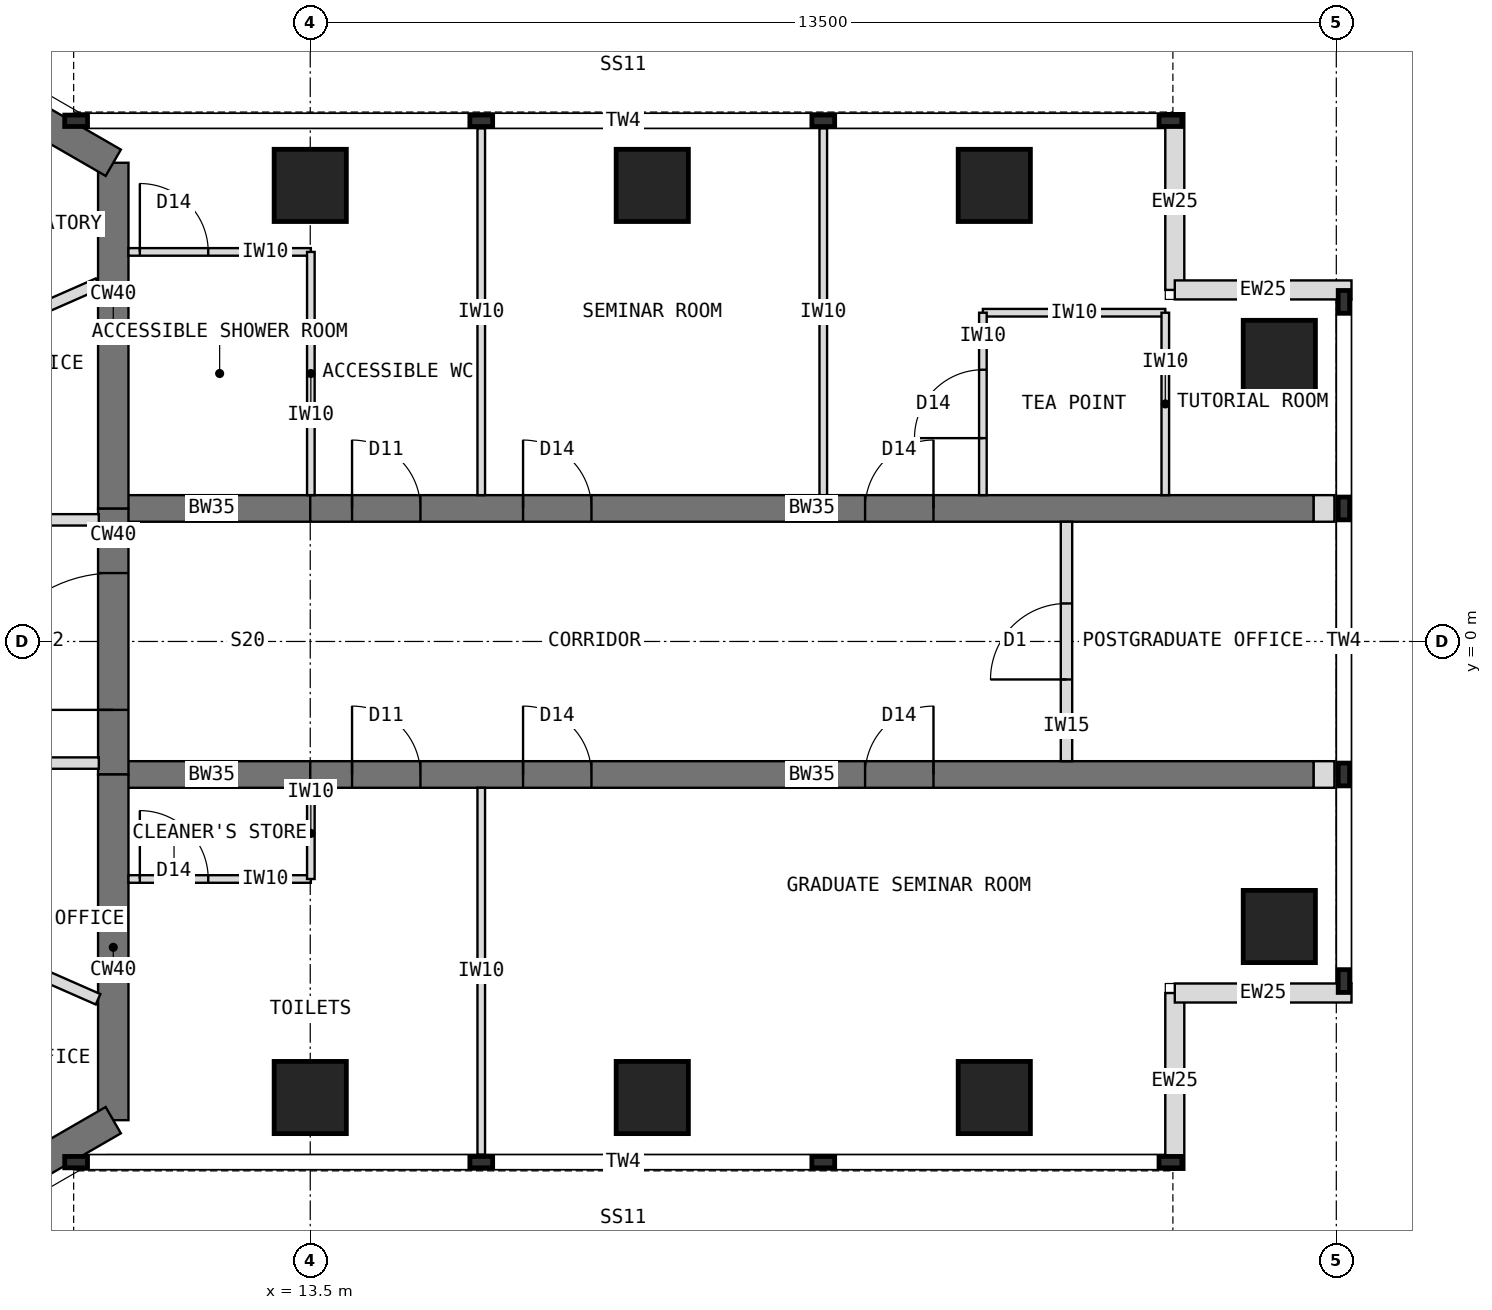
"""IFC4 building model, lengths in metres.
Left out: names, types, materials, properties, quantities, classifications, styles, units other than length and angle.
Written with IfcOpenShell. Run it as: python <this file> out.ifc"""

import sys

from ifc_helpers import new_model, si_unit, direction, frame, frame_2d, origin, origin_2d, place, context, subcontext, project, spatial, rectangle, extrude, element, fill, save


model = new_model("IFC4")
c1 = context("Model", 3, precision=1e-05, world=origin(), true_north=direction((0.0, 1.0)))
c2 = subcontext(c1, "Body", "Model", "MODEL_VIEW")
j1 = project(units=[si_unit("LENGTHUNIT", "METRE"), si_unit("PLANEANGLEUNIT", "RADIAN")], contexts=[c1])
p1 = place(None, origin())
s1 = spatial("IfcSite", under=j1, at=p1, CompositionType="ELEMENT")
p2 = place(p1, origin())
s2 = spatial("IfcBuilding", under=s1, at=p2, CompositionType="ELEMENT")
p3 = place(p2, frame((0.0, 0.0, 267.5)))
s3 = spatial("IfcBuildingStorey", under=s2, at=p3, CompositionType="ELEMENT", Elevation=267.5)
p4 = place(p3, frame((10.908, -6.298, 0.0), z_axis=(0.0, 0.0, 1.0), x_axis=(0.0, 1.0, 0.0)))
e1 = element("IfcWall", 1, at=p4, inside=s3, PredefinedType="SHEAR", context=c2, shape_type="SweptSolid", body=[
    extrude(rectangle(XDim=4.548, YDim=0.4, at=frame_2d((2.274, 0.0))), origin(), (0.0, 0.0, 1.0), 4.0),
])
p5 = place(p3, frame((10.908, -1.75, 0.0), z_axis=(0.0, 0.0, 1.0), x_axis=(0.0, 1.0, 0.0)))
e2 = element("IfcWall", 2, at=p5, inside=s3, PredefinedType="SHEAR", context=c2, shape_type="SweptSolid", body=[
    extrude(rectangle(XDim=3.5, YDim=0.4, at=frame_2d((1.75, 0.0))), origin(), (0.0, 0.0, 1.0), 4.0),
])
p6 = place(p5, frame((0.85, 0.0, 0.0)))
e3 = element("IfcOpeningElement", 3, at=p6, cuts=e2, PredefinedType="OPENING", context=c2, shape_type="SweptSolid", body=[
    extrude(rectangle(XDim=1.8, YDim=2.1, at=frame_2d((0.9, 1.05))), frame((0.0, 0.21, 0.0), z_axis=(0.0, -1.0, 0.0), x_axis=(1.0, 0.0, 0.0)), (0.0, 0.0, 1.0), 0.42),
])
p7 = place(p3, frame((10.908, 1.75, 0.0), z_axis=(0.0, 0.0, 1.0), x_axis=(0.0, 1.0, 0.0)))
e4 = element("IfcWall", 4, at=p7, inside=s3, PredefinedType="SHEAR", context=c2, shape_type="SweptSolid", body=[
    extrude(rectangle(XDim=4.548, YDim=0.4, at=frame_2d((2.274, 0.0))), origin(), (0.0, 0.0, 1.0), 4.0),
])
for number, where, z_axis, x_axis in (
    (5, (10.908, 6.298, 0.0), (0.0, 0.0, 1.0), (-0.866, 0.5, 0.0)),
    (6, (0.0, -12.596, 0.0), (0.0, 0.0, 1.0), (0.866, 0.5, 0.0)),
):
    element("IfcWall", number, at=place(p3, frame(where, z_axis=z_axis, x_axis=x_axis)), inside=s3, PredefinedType="SHEAR", context=c2, shape_type="SweptSolid", body=[
        extrude(rectangle(XDim=12.596, YDim=0.4, at=frame_2d((6.298, 0.0))), origin(), (0.0, 0.0, 1.0), 4.0),
    ])
p8 = place(p3, frame((10.908, 1.75, 0.0), z_axis=(0.0, 0.0, 1.0), x_axis=(1.0, 0.0, 0.0)))
e7 = element("IfcWall", 7, at=p8, inside=s3, PredefinedType="SHEAR", context=c2, shape_type="SweptSolid", body=[
    extrude(rectangle(XDim=2.592, YDim=0.35, at=frame_2d((1.296, 0.0))), origin(), (0.0, 0.0, 1.0), 4.0),
])
p9 = place(p3, frame((13.5, 1.75, 0.0), z_axis=(0.0, 0.0, 1.0), x_axis=(1.0, 0.0, 0.0)))
e8 = element("IfcWall", 8, at=p9, inside=s3, PredefinedType="SHEAR", context=c2, shape_type="SweptSolid", body=[
    extrude(rectangle(XDim=13.2, YDim=0.35, at=frame_2d((6.6, 0.0))), origin(), (0.0, 0.0, 1.0), 4.0),
])
p10 = place(p9, frame((0.55, 0.0, 0.0)))
e9 = element("IfcOpeningElement", 9, at=p10, cuts=e8, PredefinedType="OPENING", context=c2, shape_type="SweptSolid", body=[
    extrude(rectangle(XDim=0.9, YDim=2.1, at=frame_2d((0.45, 1.05))), frame((0.0, 0.185, 0.0), z_axis=(0.0, -1.0, 0.0), x_axis=(1.0, 0.0, 0.0)), (0.0, 0.0, 1.0), 0.37),
])
p11 = place(p9, frame((2.8, 0.0, 0.0)))
e10 = element("IfcOpeningElement", 10, at=p11, cuts=e8, PredefinedType="OPENING", context=c2, shape_type="SweptSolid", body=[
    extrude(rectangle(XDim=0.9, YDim=2.1, at=frame_2d((0.45, 1.05))), frame((0.0, 0.185, 0.0), z_axis=(0.0, -1.0, 0.0), x_axis=(1.0, 0.0, 0.0)), (0.0, 0.0, 1.0), 0.37),
])
p12 = place(p9, frame((7.3, 0.0, 0.0)))
e11 = element("IfcOpeningElement", 11, at=p12, cuts=e8, PredefinedType="OPENING", context=c2, shape_type="SweptSolid", body=[
    extrude(rectangle(XDim=0.9, YDim=2.1, at=frame_2d((0.45, 1.05))), frame((0.0, 0.185, 0.0), z_axis=(0.0, -1.0, 0.0), x_axis=(1.0, 0.0, 0.0)), (0.0, 0.0, 1.0), 0.37),
])
p13 = place(p3, frame((10.908, -1.75, 0.0), z_axis=(0.0, 0.0, 1.0), x_axis=(1.0, 0.0, 0.0)))
e12 = element("IfcWall", 12, at=p13, inside=s3, PredefinedType="SHEAR", context=c2, shape_type="SweptSolid", body=[
    extrude(rectangle(XDim=2.592, YDim=0.35, at=frame_2d((1.296, 0.0))), origin(), (0.0, 0.0, 1.0), 4.0),
])
p14 = place(p3, frame((13.5, -1.75, 0.0), z_axis=(0.0, 0.0, 1.0), x_axis=(1.0, 0.0, 0.0)))
e13 = element("IfcWall", 13, at=p14, inside=s3, PredefinedType="SHEAR", context=c2, shape_type="SweptSolid", body=[
    extrude(rectangle(XDim=13.2, YDim=0.35, at=frame_2d((6.6, 0.0))), origin(), (0.0, 0.0, 1.0), 4.0),
])
p15 = place(p14, frame((0.55, 0.0, 0.0)))
e14 = element("IfcOpeningElement", 14, at=p15, cuts=e13, PredefinedType="OPENING", context=c2, shape_type="SweptSolid", body=[
    extrude(rectangle(XDim=0.9, YDim=2.1, at=frame_2d((0.45, 1.05))), frame((0.0, 0.185, 0.0), z_axis=(0.0, -1.0, 0.0), x_axis=(1.0, 0.0, 0.0)), (0.0, 0.0, 1.0), 0.37),
])
p16 = place(p14, frame((2.8, 0.0, 0.0)))
e15 = element("IfcOpeningElement", 15, at=p16, cuts=e13, PredefinedType="OPENING", context=c2, shape_type="SweptSolid", body=[
    extrude(rectangle(XDim=0.9, YDim=2.1, at=frame_2d((0.45, 1.05))), frame((0.0, 0.185, 0.0), z_axis=(0.0, -1.0, 0.0), x_axis=(1.0, 0.0, 0.0)), (0.0, 0.0, 1.0), 0.37),
])
p17 = place(p14, frame((7.3, 0.0, 0.0)))
e16 = element("IfcOpeningElement", 16, at=p17, cuts=e13, PredefinedType="OPENING", context=c2, shape_type="SweptSolid", body=[
    extrude(rectangle(XDim=0.9, YDim=2.1, at=frame_2d((0.45, 1.05))), frame((0.0, 0.185, 0.0), z_axis=(0.0, -1.0, 0.0), x_axis=(1.0, 0.0, 0.0)), (0.0, 0.0, 1.0), 0.37),
])
for number, where, z_axis, x_axis in (
    (17, (13.5, 6.0, 0.0), (0.0, 0.0, 1.0), (1.0, 0.0, 0.0)),
    (18, (13.5, -6.0, 0.0), (0.0, 0.0, 1.0), (1.0, 0.0, 0.0)),
    (19, (18.0, 6.0, 0.0), (0.0, 0.0, 1.0), (1.0, 0.0, 0.0)),
    (20, (18.0, -6.0, 0.0), (0.0, 0.0, 1.0), (1.0, 0.0, 0.0)),
    (21, (22.5, 6.0, 0.0), (0.0, 0.0, 1.0), (1.0, 0.0, 0.0)),
    (22, (22.5, -6.0, 0.0), (0.0, 0.0, 1.0), (1.0, 0.0, 0.0)),
    (23, (26.25, 3.75, 0.0), (0.0, 0.0, 1.0), (1.0, 0.0, 0.0)),
    (24, (26.25, -3.75, 0.0), (0.0, 0.0, 1.0), (1.0, 0.0, 0.0)),
):
    element("IfcColumn", number, at=place(p3, frame(where, z_axis=z_axis, x_axis=x_axis)), inside=s3, PredefinedType="COLUMN", context=c2, shape_type="SweptSolid", body=[
        extrude(rectangle(XDim=0.95, YDim=0.95, at=origin_2d()), origin(), (0.0, 0.0, 1.0), 4.0),
    ])
for number, where, z_axis, x_axis in (
    (25, (24.875, 6.95, 0.0), (0.0, 0.0, 1.0), (0.0, -1.0, 0.0)),
    (26, (24.875, 4.625, 0.0), (0.0, 0.0, 1.0), (1.0, 0.0, 0.0)),
    (27, (24.875, -6.95, 0.0), (0.0, 0.0, 1.0), (0.0, 1.0, 0.0)),
    (28, (24.875, -4.625, 0.0), (0.0, 0.0, 1.0), (1.0, 0.0, 0.0)),
):
    element("IfcWall", number, at=place(p3, frame(where, z_axis=z_axis, x_axis=x_axis)), inside=s3, PredefinedType="STANDARD", context=c2, shape_type="SweptSolid", body=[
        extrude(rectangle(XDim=2.325, YDim=0.25, at=frame_2d((1.163, 0.0))), origin(), (0.0, 0.0, 1.0), 3.8),
    ])
for number, where, z_axis, x_axis in (
    (29, (26.7, 1.75, 0.0), (0.0, 0.0, 1.0), (1.0, 0.0, 0.0)),
    (30, (26.7, -1.75, 0.0), (0.0, 0.0, 1.0), (1.0, 0.0, 0.0)),
):
    element("IfcWall", number, at=place(p3, frame(where, z_axis=z_axis, x_axis=x_axis)), inside=s3, PredefinedType="PARTITIONING", context=c2, shape_type="SweptSolid", body=[
        extrude(rectangle(XDim=0.275, YDim=0.35, at=frame_2d((0.138, 0.0))), origin(), (0.0, 0.0, 1.0), 3.8),
    ])
for number, where, z_axis, x_axis in (
    (31, (15.75, 1.925, 0.0), (0.0, 0.0, 1.0), (0.0, 1.0, 0.0)),
    (32, (20.25, 1.925, 0.0), (0.0, 0.0, 1.0), (0.0, 1.0, 0.0)),
):
    element("IfcWall", number, at=place(p3, frame(where, z_axis=z_axis, x_axis=x_axis)), inside=s3, PredefinedType="PARTITIONING", context=c2, shape_type="SweptSolid", body=[
        extrude(rectangle(XDim=4.825, YDim=0.1, at=frame_2d((2.413, 0.0))), origin(), (0.0, 0.0, 1.0), 3.8),
    ])
p18 = place(p3, frame((22.35, 4.325, 0.0), z_axis=(0.0, 0.0, 1.0), x_axis=(1.0, 0.0, 0.0)))
e33 = element("IfcWall", 33, at=p18, inside=s3, PredefinedType="PARTITIONING", context=c2, shape_type="SweptSolid", body=[
    extrude(rectangle(XDim=2.4, YDim=0.1, at=frame_2d((1.2, 0.0))), origin(), (0.0, 0.0, 1.0), 3.8),
])
p19 = place(p3, frame((22.35, 1.925, 0.0), z_axis=(0.0, 0.0, 1.0), x_axis=(0.0, 1.0, 0.0)))
e34 = element("IfcWall", 34, at=p19, inside=s3, PredefinedType="PARTITIONING", context=c2, shape_type="SweptSolid", body=[
    extrude(rectangle(XDim=2.4, YDim=0.1, at=frame_2d((1.2, 0.0))), origin(), (0.0, 0.0, 1.0), 3.8),
])
p20 = place(p19, frame((0.75, 0.0, 0.0)))
e35 = element("IfcOpeningElement", 35, at=p20, cuts=e34, PredefinedType="OPENING", context=c2, shape_type="SweptSolid", body=[
    extrude(rectangle(XDim=0.9, YDim=2.1, at=frame_2d((0.45, 1.05))), frame((0.0, 0.06, 0.0), z_axis=(0.0, -1.0, 0.0), x_axis=(1.0, 0.0, 0.0)), (0.0, 0.0, 1.0), 0.12),
])
p21 = place(p3, frame((24.75, 1.925, 0.0), z_axis=(0.0, 0.0, 1.0), x_axis=(0.0, 1.0, 0.0)))
e36 = element("IfcWall", 36, at=p21, inside=s3, PredefinedType="PARTITIONING", context=c2, shape_type="SweptSolid", body=[
    extrude(rectangle(XDim=2.4, YDim=0.1, at=frame_2d((1.2, 0.0))), origin(), (0.0, 0.0, 1.0), 3.8),
])
p22 = place(p3, frame((11.108, 5.125, 0.0), z_axis=(0.0, 0.0, 1.0), x_axis=(1.0, 0.0, 0.0)))
e37 = element("IfcWall", 37, at=p22, inside=s3, PredefinedType="PARTITIONING", context=c2, shape_type="SweptSolid", body=[
    extrude(rectangle(XDim=2.4, YDim=0.1, at=frame_2d((1.2, 0.0))), origin(), (0.0, 0.0, 1.0), 3.8),
])
p23 = place(p22, frame((0.15, 0.0, 0.0)))
e38 = element("IfcOpeningElement", 38, at=p23, cuts=e37, PredefinedType="OPENING", context=c2, shape_type="SweptSolid", body=[
    extrude(rectangle(XDim=0.9, YDim=2.1, at=frame_2d((0.45, 1.05))), frame((0.0, 0.06, 0.0), z_axis=(0.0, -1.0, 0.0), x_axis=(1.0, 0.0, 0.0)), (0.0, 0.0, 1.0), 0.12),
])
p24 = place(p3, frame((13.508, 1.925, 0.0), z_axis=(0.0, 0.0, 1.0), x_axis=(0.0, 1.0, 0.0)))
e39 = element("IfcWall", 39, at=p24, inside=s3, PredefinedType="PARTITIONING", context=c2, shape_type="SweptSolid", body=[
    extrude(rectangle(XDim=3.2, YDim=0.1, at=frame_2d((1.6, 0.0))), origin(), (0.0, 0.0, 1.0), 3.267),
])
p25 = place(p3, frame((15.75, -1.925, 0.0), z_axis=(0.0, 0.0, 1.0), x_axis=(0.0, -1.0, 0.0)))
e40 = element("IfcWall", 40, at=p25, inside=s3, PredefinedType="PARTITIONING", context=c2, shape_type="SweptSolid", body=[
    extrude(rectangle(XDim=4.825, YDim=0.1, at=frame_2d((2.413, 0.0))), origin(), (0.0, 0.0, 1.0), 3.8),
])
p26 = place(p3, frame((11.108, -3.125, 0.0), z_axis=(0.0, 0.0, 1.0), x_axis=(1.0, 0.0, 0.0)))
e41 = element("IfcWall", 41, at=p26, inside=s3, PredefinedType="PARTITIONING", context=c2, shape_type="SweptSolid", body=[
    extrude(rectangle(XDim=2.4, YDim=0.1, at=frame_2d((1.2, 0.0))), origin(), (0.0, 0.0, 1.0), 3.8),
])
p27 = place(p26, frame((0.15, 0.0, 0.0)))
e42 = element("IfcOpeningElement", 42, at=p27, cuts=e41, PredefinedType="OPENING", context=c2, shape_type="SweptSolid", body=[
    extrude(rectangle(XDim=0.9, YDim=2.1, at=frame_2d((0.45, 1.05))), frame((0.0, 0.06, 0.0), z_axis=(0.0, -1.0, 0.0), x_axis=(1.0, 0.0, 0.0)), (0.0, 0.0, 1.0), 0.12),
])
p28 = place(p3, frame((13.508, -1.925, 0.0), z_axis=(0.0, 0.0, 1.0), x_axis=(0.0, -1.0, 0.0)))
e43 = element("IfcWall", 43, at=p28, inside=s3, PredefinedType="PARTITIONING", context=c2, shape_type="SweptSolid", body=[
    extrude(rectangle(XDim=1.2, YDim=0.1, at=frame_2d((0.6, 0.0))), origin(), (0.0, 0.0, 1.0), 3.267),
])
p29 = place(p3, frame((6.1, 1.6, 0.0), z_axis=(0.0, 0.0, 1.0), x_axis=(1.0, 0.0, 0.0)))
e44 = element("IfcWall", 44, at=p29, inside=s3, PredefinedType="PARTITIONING", context=c2, shape_type="SweptSolid", body=[
    extrude(rectangle(XDim=4.618, YDim=0.15, at=frame_2d((2.309, 0.0))), origin(), (0.0, 0.0, 1.0), 3.8),
])
p30 = place(p29, frame((1.819, 0.0, 0.0)))
e45 = element("IfcOpeningElement", 45, at=p30, cuts=e44, PredefinedType="OPENING", context=c2, shape_type="SweptSolid", body=[
    extrude(rectangle(XDim=1.0, YDim=2.1, at=frame_2d((0.5, 1.05))), frame((0.0, 0.085, 0.0), z_axis=(0.0, -1.0, 0.0), x_axis=(1.0, 0.0, 0.0)), (0.0, 0.0, 1.0), 0.17),
])
p31 = place(p3, frame((10.718, -1.6, 0.0), z_axis=(0.0, 0.0, 1.0), x_axis=(-1.0, 0.0, 0.0)))
e46 = element("IfcWall", 46, at=p31, inside=s3, PredefinedType="PARTITIONING", context=c2, shape_type="SweptSolid", body=[
    extrude(rectangle(XDim=4.618, YDim=0.15, at=frame_2d((2.309, 0.0))), origin(), (0.0, 0.0, 1.0), 3.8),
])
p32 = place(p31, frame((1.799, 0.0, 0.0)))
e47 = element("IfcOpeningElement", 47, at=p32, cuts=e46, PredefinedType="OPENING", context=c2, shape_type="SweptSolid", body=[
    extrude(rectangle(XDim=1.0, YDim=2.1, at=frame_2d((0.5, 1.05))), frame((0.0, 0.085, 0.0), z_axis=(0.0, -1.0, 0.0), x_axis=(1.0, 0.0, 0.0)), (0.0, 0.0, 1.0), 0.17),
])
p33 = place(p3, frame((6.344, -2.789, 0.0), z_axis=(0.0, 0.0, 1.0), x_axis=(0.915438841787, -0.402457111937, 0.0)))
e48 = element("IfcWall", 48, at=p33, inside=s3, PredefinedType="PARTITIONING", context=c2, shape_type="SweptSolid", body=[
    extrude(rectangle(XDim=4.767, YDim=0.15, at=frame_2d((2.383, 0.0))), origin(), (0.0, 0.0, 1.0), 3.8),
])
p34 = place(p33, frame((1.883, 0.0, 0.0)))
e49 = element("IfcOpeningElement", 49, at=p34, cuts=e48, PredefinedType="OPENING", context=c2, shape_type="SweptSolid", body=[
    extrude(rectangle(XDim=1.0, YDim=2.1, at=frame_2d((0.5, 1.05))), frame((0.0, 0.085, 0.0), z_axis=(0.0, -1.0, 0.0), x_axis=(1.0, 0.0, 0.0)), (0.0, 0.0, 1.0), 0.17),
])
p35 = place(p3, frame((6.344, 2.789, 0.0), z_axis=(0.0, 0.0, 1.0), x_axis=(0.915438841787, 0.402457111937, 0.0)))
e50 = element("IfcWall", 50, at=p35, inside=s3, PredefinedType="PARTITIONING", context=c2, shape_type="SweptSolid", body=[
    extrude(rectangle(XDim=4.767, YDim=0.15, at=frame_2d((2.383, 0.0))), origin(), (0.0, 0.0, 1.0), 3.8),
])
p36 = place(p35, frame((1.883, 0.0, 0.0)))
e51 = element("IfcOpeningElement", 51, at=p36, cuts=e50, PredefinedType="OPENING", context=c2, shape_type="SweptSolid", body=[
    extrude(rectangle(XDim=1.0, YDim=2.1, at=frame_2d((0.5, 1.05))), frame((0.0, 0.085, 0.0), z_axis=(0.0, -1.0, 0.0), x_axis=(1.0, 0.0, 0.0)), (0.0, 0.0, 1.0), 0.17),
])
p37 = place(p3, frame((23.45, -1.575, 0.0), z_axis=(0.0, 0.0, 1.0), x_axis=(0.0, 1.0, 0.0)))
e52 = element("IfcWall", 52, at=p37, inside=s3, PredefinedType="PARTITIONING", context=c2, shape_type="SweptSolid", body=[
    extrude(rectangle(XDim=3.15, YDim=0.15, at=frame_2d((1.575, 0.0))), origin(), (0.0, 0.0, 1.0), 3.8),
])
p38 = place(p37, frame((1.075, 0.0, 0.0)))
e53 = element("IfcOpeningElement", 53, at=p38, cuts=e52, PredefinedType="OPENING", context=c2, shape_type="SweptSolid", body=[
    extrude(rectangle(XDim=1.0, YDim=2.1, at=frame_2d((0.5, 1.05))), frame((0.0, 0.085, 0.0), z_axis=(0.0, -1.0, 0.0), x_axis=(1.0, 0.0, 0.0)), (0.0, 0.0, 1.0), 0.17),
])
p39 = place(p6, origin())
e54 = element("IfcDoor", 54, at=p39, inside=s3, OperationType="DOUBLE_DOOR_DOUBLE_SWING", PredefinedType="DOOR", context=c2, shape_type="SweptSolid", body=[
    extrude(rectangle(XDim=1.8, YDim=2.1, at=frame_2d((0.9, 1.05))), frame((0.0, 0.025, 0.0), z_axis=(0.0, -1.0, 0.0), x_axis=(1.0, 0.0, 0.0)), (0.0, 0.0, 1.0), 0.05),
])
fill(e3, e54)
p40 = place(p20, origin())
e55 = element("IfcDoor", 55, at=p40, inside=s3, OperationType="SINGLE_SWING_LEFT", PredefinedType="DOOR", context=c2, shape_type="SweptSolid", body=[
    extrude(rectangle(XDim=0.9, YDim=2.1, at=frame_2d((0.45, 1.05))), frame((0.0, 0.025, 0.0), z_axis=(0.0, -1.0, 0.0), x_axis=(1.0, 0.0, 0.0)), (0.0, 0.0, 1.0), 0.05),
])
fill(e35, e55)
p41 = place(p23, origin())
e56 = element("IfcDoor", 56, at=p41, inside=s3, OperationType="SINGLE_SWING_LEFT", PredefinedType="DOOR", context=c2, shape_type="SweptSolid", body=[
    extrude(rectangle(XDim=0.9, YDim=2.1, at=frame_2d((0.45, 1.05))), frame((0.0, 0.025, 0.0), z_axis=(0.0, -1.0, 0.0), x_axis=(1.0, 0.0, 0.0)), (0.0, 0.0, 1.0), 0.05),
])
fill(e38, e56)
p42 = place(p27, origin())
e57 = element("IfcDoor", 57, at=p42, inside=s3, OperationType="SINGLE_SWING_LEFT", PredefinedType="DOOR", context=c2, shape_type="SweptSolid", body=[
    extrude(rectangle(XDim=0.9, YDim=2.1, at=frame_2d((0.45, 1.05))), frame((0.0, 0.025, 0.0), z_axis=(0.0, -1.0, 0.0), x_axis=(1.0, 0.0, 0.0)), (0.0, 0.0, 1.0), 0.05),
])
fill(e42, e57)
p43 = place(p38, origin())
e58 = element("IfcDoor", 58, at=p43, inside=s3, OperationType="SINGLE_SWING_LEFT", PredefinedType="DOOR", context=c2, shape_type="SweptSolid", body=[
    extrude(rectangle(XDim=1.0, YDim=2.1, at=frame_2d((0.5, 1.05))), frame((0.0, 0.025, 0.0), z_axis=(0.0, -1.0, 0.0), x_axis=(1.0, 0.0, 0.0)), (0.0, 0.0, 1.0), 0.05),
])
fill(e53, e58)
p44 = place(p10, origin())
e59 = element("IfcDoor", 59, at=p44, inside=s3, OperationType="SINGLE_SWING_LEFT", PredefinedType="DOOR", context=c2, shape_type="SweptSolid", body=[
    extrude(rectangle(XDim=0.9, YDim=2.1, at=frame_2d((0.45, 1.05))), frame((0.0, 0.025, 0.0), z_axis=(0.0, -1.0, 0.0), x_axis=(1.0, 0.0, 0.0)), (0.0, 0.0, 1.0), 0.05),
])
fill(e9, e59)
p45 = place(p11, origin())
e60 = element("IfcDoor", 60, at=p45, inside=s3, OperationType="SINGLE_SWING_LEFT", PredefinedType="DOOR", context=c2, shape_type="SweptSolid", body=[
    extrude(rectangle(XDim=0.9, YDim=2.1, at=frame_2d((0.45, 1.05))), frame((0.0, 0.025, 0.0), z_axis=(0.0, -1.0, 0.0), x_axis=(1.0, 0.0, 0.0)), (0.0, 0.0, 1.0), 0.05),
])
fill(e10, e60)
p46 = place(p12, origin())
e61 = element("IfcDoor", 61, at=p46, inside=s3, OperationType="SINGLE_SWING_RIGHT", PredefinedType="DOOR", context=c2, shape_type="SweptSolid", body=[
    extrude(rectangle(XDim=0.9, YDim=2.1, at=frame_2d((0.45, 1.05))), frame((0.0, 0.025, 0.0), z_axis=(0.0, -1.0, 0.0), x_axis=(1.0, 0.0, 0.0)), (0.0, 0.0, 1.0), 0.05),
])
fill(e11, e61)
p47 = place(p15, origin())
e62 = element("IfcDoor", 62, at=p47, inside=s3, OperationType="SINGLE_SWING_LEFT", PredefinedType="DOOR", context=c2, shape_type="SweptSolid", body=[
    extrude(rectangle(XDim=0.9, YDim=2.1, at=frame_2d((0.45, 1.05))), frame((0.0, 0.025, 0.0), z_axis=(0.0, -1.0, 0.0), x_axis=(1.0, 0.0, 0.0)), (0.0, 0.0, 1.0), 0.05),
])
fill(e14, e62)
p48 = place(p16, origin())
e63 = element("IfcDoor", 63, at=p48, inside=s3, OperationType="SINGLE_SWING_LEFT", PredefinedType="DOOR", context=c2, shape_type="SweptSolid", body=[
    extrude(rectangle(XDim=0.9, YDim=2.1, at=frame_2d((0.45, 1.05))), frame((0.0, 0.025, 0.0), z_axis=(0.0, -1.0, 0.0), x_axis=(1.0, 0.0, 0.0)), (0.0, 0.0, 1.0), 0.05),
])
fill(e15, e63)
p49 = place(p17, origin())
e64 = element("IfcDoor", 64, at=p49, inside=s3, OperationType="SINGLE_SWING_RIGHT", PredefinedType="DOOR", context=c2, shape_type="SweptSolid", body=[
    extrude(rectangle(XDim=0.9, YDim=2.1, at=frame_2d((0.45, 1.05))), frame((0.0, 0.025, 0.0), z_axis=(0.0, -1.0, 0.0), x_axis=(1.0, 0.0, 0.0)), (0.0, 0.0, 1.0), 0.05),
])
fill(e16, e64)
save(model, sys.argv[1])
